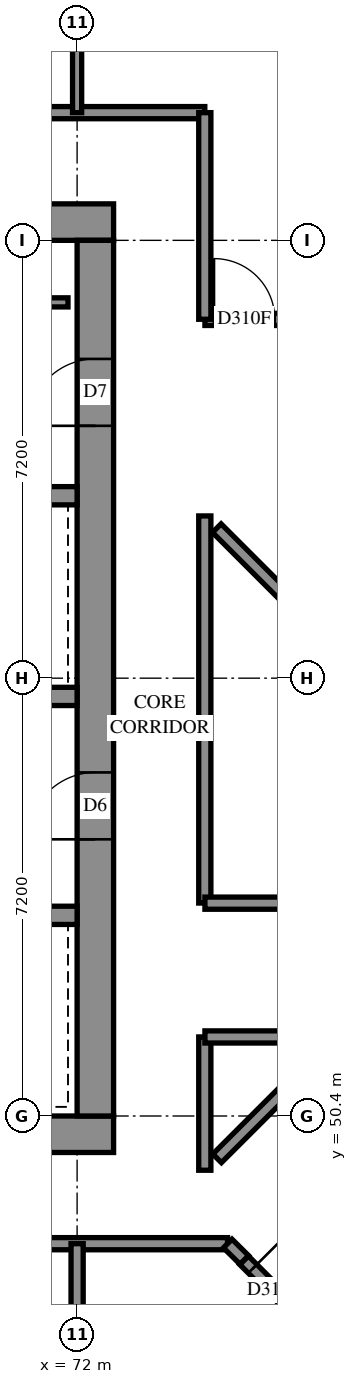
"""IFC4 building model, lengths in metres.
Left out: names, types, materials, properties, quantities, classifications, styles, units other than length and angle.
Written with IfcOpenShell. Run it as: python <this file> out.ifc"""

import sys

from ifc_helpers import new_model, si_unit, direction, frame, frame_2d, origin, place, context, subcontext, project, spatial, rectangle, extrude, element, fill, save


model = new_model("IFC4")
c1 = context("Model", 3, precision=1e-05, world=origin(), true_north=direction((0.0, 1.0)))
c2 = subcontext(c1, "Body", "Model", "MODEL_VIEW")
j1 = project(units=[si_unit("LENGTHUNIT", "METRE"), si_unit("PLANEANGLEUNIT", "RADIAN")], contexts=[c1])
p1 = place(None, origin())
s1 = spatial("IfcSite", under=j1, at=p1, CompositionType="ELEMENT")
p2 = place(p1, origin())
s2 = spatial("IfcBuilding", under=s1, at=p2, CompositionType="ELEMENT")
p3 = place(p2, frame((0.0, 0.0, 145.6)))
s3 = spatial("IfcBuildingStorey", under=s2, at=p3, CompositionType="ELEMENT", Elevation=145.6)
p4 = place(p3, frame((57.0, 50.1, -0.3), z_axis=(0.0, 0.0, 1.0), x_axis=(1.0, 0.0, 0.0)))
e1 = element("IfcWall", 1, at=p4, inside=s3, PredefinedType="SHEAR", context=c2, shape_type="SweptSolid", body=[
    extrude(rectangle(XDim=15.6, YDim=0.6, at=frame_2d((7.8, 0.0))), origin(), (0.0, 0.0, 1.0), 2.7),
])
p5 = place(p3, frame((57.0, 65.1, -0.3), z_axis=(0.0, 0.0, 1.0), x_axis=(1.0, 0.0, 0.0)))
e2 = element("IfcWall", 2, at=p5, inside=s3, PredefinedType="SHEAR", context=c2, shape_type="SweptSolid", body=[
    extrude(rectangle(XDim=15.6, YDim=0.6, at=frame_2d((7.8, 0.0))), origin(), (0.0, 0.0, 1.0), 2.7),
])
p6 = place(p5, frame((10.6, 0.0, 0.3)))
e3 = element("IfcOpeningElement", 3, at=p6, cuts=e2, PredefinedType="OPENING", context=c2, shape_type="SweptSolid", body=[
    extrude(rectangle(XDim=0.8, YDim=2.1, at=frame_2d((0.4, 1.05))), frame((0.0, 0.31, 0.0), z_axis=(0.0, -1.0, 0.0), x_axis=(1.0, 0.0, 0.0)), (0.0, 0.0, 1.0), 0.62),
])
p7 = place(p3, frame((72.3, 50.4, -0.3), z_axis=(0.0, 0.0, 1.0), x_axis=(0.0, 1.0, 0.0)))
e4 = element("IfcWall", 4, at=p7, inside=s3, PredefinedType="SHEAR", context=c2, shape_type="SweptSolid", body=[
    extrude(rectangle(XDim=14.4, YDim=0.6, at=frame_2d((7.2, 0.0))), origin(), (0.0, 0.0, 1.0), 2.7),
])
p8 = place(p7, frame((4.55, 0.0, 0.3)))
e5 = element("IfcOpeningElement", 5, at=p8, cuts=e4, PredefinedType="OPENING", context=c2, shape_type="SweptSolid", body=[
    extrude(rectangle(XDim=1.1, YDim=2.1, at=frame_2d((0.55, 1.05))), frame((0.0, 0.31, 0.0), z_axis=(0.0, -1.0, 0.0), x_axis=(1.0, 0.0, 0.0)), (0.0, 0.0, 1.0), 0.62),
])
p9 = place(p7, frame((11.35, 0.0, 0.3)))
e6 = element("IfcOpeningElement", 6, at=p9, cuts=e4, PredefinedType="OPENING", context=c2, shape_type="SweptSolid", body=[
    extrude(rectangle(XDim=1.1, YDim=2.1, at=frame_2d((0.55, 1.05))), frame((0.0, 0.31, 0.0), z_axis=(0.0, -1.0, 0.0), x_axis=(1.0, 0.0, 0.0)), (0.0, 0.0, 1.0), 0.62),
])
p10 = place(p3, frame((57.6, 53.7, 0.0), z_axis=(0.0, 0.0, 1.0), x_axis=(1.0, 0.0, 0.0)))
e7 = element("IfcWall", 7, at=p10, inside=s3, PredefinedType="SOLIDWALL", context=c2, shape_type="SweptSolid", body=[
    extrude(rectangle(XDim=14.4, YDim=0.3, at=frame_2d((7.2, 0.0))), origin(), (0.0, 0.0, 1.0), 3.1),
])
p11 = place(p10, frame((1.35, 0.0, 0.0)))
e8 = element("IfcOpeningElement", 8, at=p11, cuts=e7, PredefinedType="OPENING", context=c2, shape_type="SweptSolid", body=[
    extrude(rectangle(XDim=0.9, YDim=2.1, at=frame_2d((0.45, 1.05))), frame((0.0, 0.16, 0.0), z_axis=(0.0, -1.0, 0.0), x_axis=(1.0, 0.0, 0.0)), (0.0, 0.0, 1.0), 0.32),
])
p12 = place(p10, frame((4.95, 0.0, 0.0)))
e9 = element("IfcOpeningElement", 9, at=p12, cuts=e7, PredefinedType="OPENING", context=c2, shape_type="SweptSolid", body=[
    extrude(rectangle(XDim=0.9, YDim=2.1, at=frame_2d((0.45, 1.05))), frame((0.0, 0.16, 0.0), z_axis=(0.0, -1.0, 0.0), x_axis=(1.0, 0.0, 0.0)), (0.0, 0.0, 1.0), 0.32),
])
p13 = place(p10, frame((8.55, 0.0, 0.0)))
e10 = element("IfcOpeningElement", 10, at=p13, cuts=e7, PredefinedType="OPENING", context=c2, shape_type="SweptSolid", body=[
    extrude(rectangle(XDim=0.9, YDim=2.1, at=frame_2d((0.45, 1.05))), frame((0.0, 0.16, 0.0), z_axis=(0.0, -1.0, 0.0), x_axis=(1.0, 0.0, 0.0)), (0.0, 0.0, 1.0), 0.32),
])
p14 = place(p10, frame((12.05, 0.0, 0.0)))
e11 = element("IfcOpeningElement", 11, at=p14, cuts=e7, PredefinedType="OPENING", context=c2, shape_type="SweptSolid", body=[
    extrude(rectangle(XDim=1.1, YDim=2.1, at=frame_2d((0.55, 1.05))), frame((0.0, 0.16, 0.0), z_axis=(0.0, -1.0, 0.0), x_axis=(1.0, 0.0, 0.0)), (0.0, 0.0, 1.0), 0.32),
])
p15 = place(p3, frame((57.6, 57.3, 0.0), z_axis=(0.0, 0.0, 1.0), x_axis=(1.0, 0.0, 0.0)))
e12 = element("IfcWall", 12, at=p15, inside=s3, PredefinedType="SOLIDWALL", context=c2, shape_type="SweptSolid", body=[
    extrude(rectangle(XDim=14.4, YDim=0.3, at=frame_2d((7.2, 0.0))), origin(), (0.0, 0.0, 1.0), 3.1),
])
p16 = place(p15, frame((1.25, 0.0, 0.0)))
e13 = element("IfcOpeningElement", 13, at=p16, cuts=e12, PredefinedType="OPENING", context=c2, shape_type="SweptSolid", body=[
    extrude(rectangle(XDim=1.1, YDim=2.1, at=frame_2d((0.55, 1.05))), frame((0.0, 0.16, 0.0), z_axis=(0.0, -1.0, 0.0), x_axis=(1.0, 0.0, 0.0)), (0.0, 0.0, 1.0), 0.32),
])
p17 = place(p15, frame((4.85, 0.0, 0.0)))
e14 = element("IfcOpeningElement", 14, at=p17, cuts=e12, PredefinedType="OPENING", context=c2, shape_type="SweptSolid", body=[
    extrude(rectangle(XDim=1.1, YDim=2.1, at=frame_2d((0.55, 1.05))), frame((0.0, 0.16, 0.0), z_axis=(0.0, -1.0, 0.0), x_axis=(1.0, 0.0, 0.0)), (0.0, 0.0, 1.0), 0.32),
])
p18 = place(p15, frame((8.45, 0.0, 0.0)))
e15 = element("IfcOpeningElement", 15, at=p18, cuts=e12, PredefinedType="OPENING", context=c2, shape_type="SweptSolid", body=[
    extrude(rectangle(XDim=1.1, YDim=2.1, at=frame_2d((0.55, 1.05))), frame((0.0, 0.16, 0.0), z_axis=(0.0, -1.0, 0.0), x_axis=(1.0, 0.0, 0.0)), (0.0, 0.0, 1.0), 0.32),
])
p19 = place(p15, frame((12.05, 0.0, 0.0)))
e16 = element("IfcOpeningElement", 16, at=p19, cuts=e12, PredefinedType="OPENING", context=c2, shape_type="SweptSolid", body=[
    extrude(rectangle(XDim=1.1, YDim=2.1, at=frame_2d((0.55, 1.05))), frame((0.0, 0.16, 0.0), z_axis=(0.0, -1.0, 0.0), x_axis=(1.0, 0.0, 0.0)), (0.0, 0.0, 1.0), 0.32),
])
p20 = place(p3, frame((64.8, 60.6, 0.0), z_axis=(0.0, 0.0, 1.0), x_axis=(1.0, 0.0, 0.0)))
e17 = element("IfcWall", 17, at=p20, inside=s3, PredefinedType="SOLIDWALL", context=c2, shape_type="SweptSolid", body=[
    extrude(rectangle(XDim=7.2, YDim=0.3, at=frame_2d((3.6, 0.0))), origin(), (0.0, 0.0, 1.0), 3.1),
])
p21 = place(p3, frame((64.95, 63.78, 0.0), z_axis=(0.0, 0.0, 1.0), x_axis=(1.0, 0.0, 0.0)))
e18 = element("IfcWall", 18, at=p21, inside=s3, PredefinedType="PARTITIONING", context=c2, shape_type="SweptSolid", body=[
    extrude(rectangle(XDim=6.9, YDim=0.15, at=frame_2d((3.45, 0.0))), origin(), (0.0, 0.0, 1.0), 3.1),
])
p22 = place(p3, frame((55.5, 48.3, 0.0), z_axis=(0.0, 0.0, 1.0), x_axis=(1.0, 0.0, 0.0)))
e19 = element("IfcWall", 19, at=p22, inside=s3, PredefinedType="PARTITIONING", context=c2, shape_type="SweptSolid", body=[
    extrude(rectangle(XDim=18.974, YDim=0.2, at=frame_2d((9.487, 0.0))), origin(), (0.0, 0.0, 1.0), 3.1),
])
p23 = place(p22, frame((4.4, 0.0, 0.0)))
e20 = element("IfcOpeningElement", 20, at=p23, cuts=e19, PredefinedType="OPENING", context=c2, shape_type="SweptSolid", body=[
    extrude(rectangle(XDim=0.9, YDim=2.1, at=frame_2d((0.45, 1.05))), frame((0.0, 0.11, 0.0), z_axis=(0.0, -1.0, 0.0), x_axis=(1.0, 0.0, 0.0)), (0.0, 0.0, 1.0), 0.22),
])
p24 = place(p22, frame((6.1, 0.0, 0.0)))
e21 = element("IfcOpeningElement", 21, at=p24, cuts=e19, PredefinedType="OPENING", context=c2, shape_type="SweptSolid", body=[
    extrude(rectangle(XDim=0.9, YDim=2.1, at=frame_2d((0.45, 1.05))), frame((0.0, 0.11, 0.0), z_axis=(0.0, -1.0, 0.0), x_axis=(1.0, 0.0, 0.0)), (0.0, 0.0, 1.0), 0.22),
])
p25 = place(p22, frame((13.162, 0.0, 0.0)))
e22 = element("IfcOpeningElement", 22, at=p25, cuts=e19, PredefinedType="OPENING", context=c2, shape_type="SweptSolid", body=[
    extrude(rectangle(XDim=1.0, YDim=2.1, at=frame_2d((0.5, 1.05))), frame((0.0, 0.11, 0.0), z_axis=(0.0, -1.0, 0.0), x_axis=(1.0, 0.0, 0.0)), (0.0, 0.0, 1.0), 0.22),
])
p26 = place(p3, frame((55.5, 66.9, 0.0), z_axis=(0.0, 0.0, 1.0), x_axis=(1.0, 0.0, 0.0)))
e23 = element("IfcWall", 23, at=p26, inside=s3, PredefinedType="PARTITIONING", context=c2, shape_type="SweptSolid", body=[
    extrude(rectangle(XDim=18.6, YDim=0.2, at=frame_2d((9.3, 0.0))), origin(), (0.0, 0.0, 1.0), 3.1),
])
p27 = place(p26, frame((4.4, 0.0, 0.0)))
e24 = element("IfcOpeningElement", 24, at=p27, cuts=e23, PredefinedType="OPENING", context=c2, shape_type="SweptSolid", body=[
    extrude(rectangle(XDim=0.9, YDim=2.1, at=frame_2d((0.45, 1.05))), frame((0.0, 0.11, 0.0), z_axis=(0.0, -1.0, 0.0), x_axis=(1.0, 0.0, 0.0)), (0.0, 0.0, 1.0), 0.22),
])
p28 = place(p26, frame((6.1, 0.0, 0.0)))
e25 = element("IfcOpeningElement", 25, at=p28, cuts=e23, PredefinedType="OPENING", context=c2, shape_type="SweptSolid", body=[
    extrude(rectangle(XDim=0.9, YDim=2.1, at=frame_2d((0.45, 1.05))), frame((0.0, 0.11, 0.0), z_axis=(0.0, -1.0, 0.0), x_axis=(1.0, 0.0, 0.0)), (0.0, 0.0, 1.0), 0.22),
])
p29 = place(p26, frame((11.65, 0.0, 0.0)))
e26 = element("IfcOpeningElement", 26, at=p29, cuts=e23, PredefinedType="OPENING", context=c2, shape_type="SweptSolid", body=[
    extrude(rectangle(XDim=0.9, YDim=2.1, at=frame_2d((0.45, 1.05))), frame((0.0, 0.11, 0.0), z_axis=(0.0, -1.0, 0.0), x_axis=(1.0, 0.0, 0.0)), (0.0, 0.0, 1.0), 0.22),
])
p30 = place(p26, frame((13.3, 0.0, 0.0)))
e27 = element("IfcOpeningElement", 27, at=p30, cuts=e23, PredefinedType="OPENING", context=c2, shape_type="SweptSolid", body=[
    extrude(rectangle(XDim=0.9, YDim=2.1, at=frame_2d((0.45, 1.05))), frame((0.0, 0.11, 0.0), z_axis=(0.0, -1.0, 0.0), x_axis=(1.0, 0.0, 0.0)), (0.0, 0.0, 1.0), 0.22),
])
p31 = place(p3, frame((74.1, 53.902, 0.0), z_axis=(0.0, 0.0, 1.0), x_axis=(0.0, 1.0, 0.0)))
e28 = element("IfcWall", 28, at=p31, inside=s3, PredefinedType="PARTITIONING", context=c2, shape_type="SweptSolid", body=[
    extrude(rectangle(XDim=6.366, YDim=0.2, at=frame_2d((3.183, 0.0))), origin(), (0.0, 0.0, 1.0), 3.1),
])
p32 = place(p3, frame((74.102, 63.5, 0.0), z_axis=(0.0, 0.0, 1.0), x_axis=(1.0, 0.0, 0.0)))
e29 = element("IfcWall", 29, at=p32, inside=s3, PredefinedType="PARTITIONING", context=c2, shape_type="SweptSolid", body=[
    extrude(rectangle(XDim=5.098, YDim=0.2, at=frame_2d((2.549, 0.0))), origin(), (0.0, 0.0, 1.0), 3.1),
])
p33 = place(p32, frame((0.149, 0.0, 0.0)))
e30 = element("IfcOpeningElement", 30, at=p33, cuts=e29, PredefinedType="OPENING", context=c2, shape_type="SweptSolid", body=[
    extrude(rectangle(XDim=1.0, YDim=2.1, at=frame_2d((0.5, 1.05))), frame((0.0, 0.11, 0.0), z_axis=(0.0, -1.0, 0.0), x_axis=(1.0, 0.0, 0.0)), (0.0, 0.0, 1.0), 0.22),
])
p34 = place(p32, frame((3.688, 0.0, 0.0)))
e31 = element("IfcOpeningElement", 31, at=p34, cuts=e29, PredefinedType="OPENING", context=c2, shape_type="SweptSolid", body=[
    extrude(rectangle(XDim=0.9, YDim=2.1, at=frame_2d((0.45, 1.05))), frame((0.0, 0.11, 0.0), z_axis=(0.0, -1.0, 0.0), x_axis=(1.0, 0.0, 0.0)), (0.0, 0.0, 1.0), 0.22),
])
p35 = place(p3, frame((72.0, 43.65, 0.0), z_axis=(0.0, 0.0, 1.0), x_axis=(0.0, 1.0, 0.0)))
e32 = element("IfcWall", 32, at=p35, inside=s3, PredefinedType="PARTITIONING", context=c2, shape_type="SweptSolid", body=[
    extrude(rectangle(XDim=4.65, YDim=0.2, at=frame_2d((2.325, 0.0))), origin(), (0.0, 0.0, 1.0), 3.1),
])
p36 = place(p3, frame((74.745, 48.029, 0.0), z_axis=(0.0, 0.0, 1.0), x_axis=(0.7068806156, -0.7073328745, 0.0)))
e33 = element("IfcWall", 33, at=p36, inside=s3, PredefinedType="PARTITIONING", context=c2, shape_type="SweptSolid", body=[
    extrude(rectangle(XDim=4.422, YDim=0.2, at=frame_2d((2.211, 0.0))), origin(), (0.0, 0.0, 1.0), 3.1),
])
p37 = place(p36, frame((0.199, 0.0, 0.0)))
e34 = element("IfcOpeningElement", 34, at=p37, cuts=e33, PredefinedType="OPENING", context=c2, shape_type="SweptSolid", body=[
    extrude(rectangle(XDim=1.0, YDim=2.1, at=frame_2d((0.5, 1.05))), frame((0.0, 0.11, 0.0), z_axis=(0.0, -1.0, 0.0), x_axis=(1.0, 0.0, 0.0)), (0.0, 0.0, 1.0), 0.22),
])
p38 = place(p3, frame((74.102, 53.9, 0.0), z_axis=(0.0, 0.0, 1.0), x_axis=(1.0, 0.0, 0.0)))
e35 = element("IfcWall", 35, at=p38, inside=s3, PredefinedType="PARTITIONING", context=c2, shape_type="SweptSolid", body=[
    extrude(rectangle(XDim=4.392, YDim=0.2, at=frame_2d((2.196, 0.0))), origin(), (0.0, 0.0, 1.0), 3.1),
])
p39 = place(p38, frame((1.415, 0.0, 0.0)))
e36 = element("IfcOpeningElement", 36, at=p39, cuts=e35, PredefinedType="OPENING", context=c2, shape_type="SweptSolid", body=[
    extrude(rectangle(XDim=1.0, YDim=2.1, at=frame_2d((0.5, 1.05))), frame((0.0, 0.11, 0.0), z_axis=(0.0, -1.0, 0.0), x_axis=(1.0, 0.0, 0.0)), (0.0, 0.0, 1.0), 0.22),
])
p40 = place(p3, frame((74.1, 63.502, 0.0), z_axis=(0.0, 0.0, 1.0), x_axis=(0.0, 1.0, 0.0)))
e37 = element("IfcWall", 37, at=p40, inside=s3, PredefinedType="PARTITIONING", context=c2, shape_type="SweptSolid", body=[
    extrude(rectangle(XDim=3.398, YDim=0.2, at=frame_2d((1.699, 0.0))), origin(), (0.0, 0.0, 1.0), 3.1),
])
p41 = place(p3, frame((74.302, 49.704, 0.0), z_axis=(0.0, 0.0, 1.0), x_axis=(0.7074614873, 0.706751897, 0.0)))
e38 = element("IfcWall", 38, at=p41, inside=s3, PredefinedType="PARTITIONING", context=c2, shape_type="SweptSolid", body=[
    extrude(rectangle(XDim=2.818, YDim=0.2, at=frame_2d((1.409, 0.0))), origin(), (0.0, 0.0, 1.0), 3.1),
])
p42 = place(p3, frame((72.0, 66.9, 0.0), z_axis=(0.0, 0.0, 1.0), x_axis=(0.0, 1.0, 0.0)))
e39 = element("IfcWall", 39, at=p42, inside=s3, PredefinedType="PARTITIONING", context=c2, shape_type="SweptSolid", body=[
    extrude(rectangle(XDim=2.4, YDim=0.15, at=frame_2d((1.2, 0.0))), origin(), (0.0, 0.0, 1.0), 3.1),
])
p43 = place(p3, frame((74.297, 60.067, 0.0), z_axis=(0.0, 0.0, 1.0), x_axis=(0.7071067812, -0.7071067812, 0.0)))
e40 = element("IfcWall", 40, at=p43, inside=s3, PredefinedType="PARTITIONING", context=c2, shape_type="SweptSolid", body=[
    extrude(rectangle(XDim=2.229, YDim=0.2, at=frame_2d((1.114, 0.0))), origin(), (0.0, 0.0, 1.0), 3.1),
])
p44 = place(p3, frame((74.1, 49.508, 0.0), z_axis=(0.0, 0.0, 1.0), x_axis=(0.0, 1.0, 0.0)))
e41 = element("IfcWall", 41, at=p44, inside=s3, PredefinedType="PARTITIONING", context=c2, shape_type="SweptSolid", body=[
    extrude(rectangle(XDim=2.192, YDim=0.2, at=frame_2d((1.096, 0.0))), origin(), (0.0, 0.0, 1.0), 3.1),
])
p45 = place(p3, frame((74.102, 51.7, 0.0), z_axis=(0.0, 0.0, 1.0), x_axis=(1.0, 0.0, 0.0)))
e42 = element("IfcWall", 42, at=p45, inside=s3, PredefinedType="PARTITIONING", context=c2, shape_type="SweptSolid", body=[
    extrude(rectangle(XDim=2.19, YDim=0.2, at=frame_2d((1.095, 0.0))), origin(), (0.0, 0.0, 1.0), 3.1),
])
p46 = place(p3, frame((74.477, 48.303, 0.0), z_axis=(0.0, 0.0, 1.0), x_axis=(0.7097111995, -0.7044927348, 0.0)))
e43 = element("IfcWall", 43, at=p46, inside=s3, PredefinedType="PARTITIONING", context=c2, shape_type="SweptSolid", body=[
    extrude(rectangle(XDim=0.383, YDim=0.2, at=frame_2d((0.192, 0.0))), origin(), (0.0, 0.0, 1.0), 3.1),
])
p47 = place(p8, origin())
e44 = element("IfcDoor", 44, at=p47, inside=s3, OperationType="DOUBLE_DOOR_SINGLE_SWING", PredefinedType="DOOR", context=c2, shape_type="SweptSolid", body=[
    extrude(rectangle(XDim=1.1, YDim=2.1, at=frame_2d((0.55, 1.05))), frame((0.0, 0.025, 0.0), z_axis=(0.0, -1.0, 0.0), x_axis=(1.0, 0.0, 0.0)), (0.0, 0.0, 1.0), 0.05),
])
fill(e5, e44)
p48 = place(p9, origin())
e45 = element("IfcDoor", 45, at=p48, inside=s3, OperationType="SINGLE_SWING_RIGHT", PredefinedType="DOOR", context=c2, shape_type="SweptSolid", body=[
    extrude(rectangle(XDim=1.1, YDim=2.1, at=frame_2d((0.55, 1.05))), frame((0.0, 0.025, 0.0), z_axis=(0.0, -1.0, 0.0), x_axis=(1.0, 0.0, 0.0)), (0.0, 0.0, 1.0), 0.05),
])
fill(e6, e45)
p49 = place(p33, origin())
e46 = element("IfcDoor", 46, at=p49, inside=s3, OperationType="SINGLE_SWING_RIGHT", PredefinedType="DOOR", context=c2, shape_type="SweptSolid", body=[
    extrude(rectangle(XDim=1.0, YDim=2.1, at=frame_2d((0.5, 1.05))), frame((0.0, 0.025, 0.0), z_axis=(0.0, -1.0, 0.0), x_axis=(1.0, 0.0, 0.0)), (0.0, 0.0, 1.0), 0.05),
])
fill(e30, e46)
p50 = place(p37, origin())
e47 = element("IfcDoor", 47, at=p50, inside=s3, OperationType="SINGLE_SWING_LEFT", PredefinedType="DOOR", context=c2, shape_type="SweptSolid", body=[
    extrude(rectangle(XDim=1.0, YDim=2.1, at=frame_2d((0.5, 1.05))), frame((0.0, 0.025, 0.0), z_axis=(0.0, -1.0, 0.0), x_axis=(1.0, 0.0, 0.0)), (0.0, 0.0, 1.0), 0.05),
])
fill(e34, e47)
save(model, sys.argv[1])
